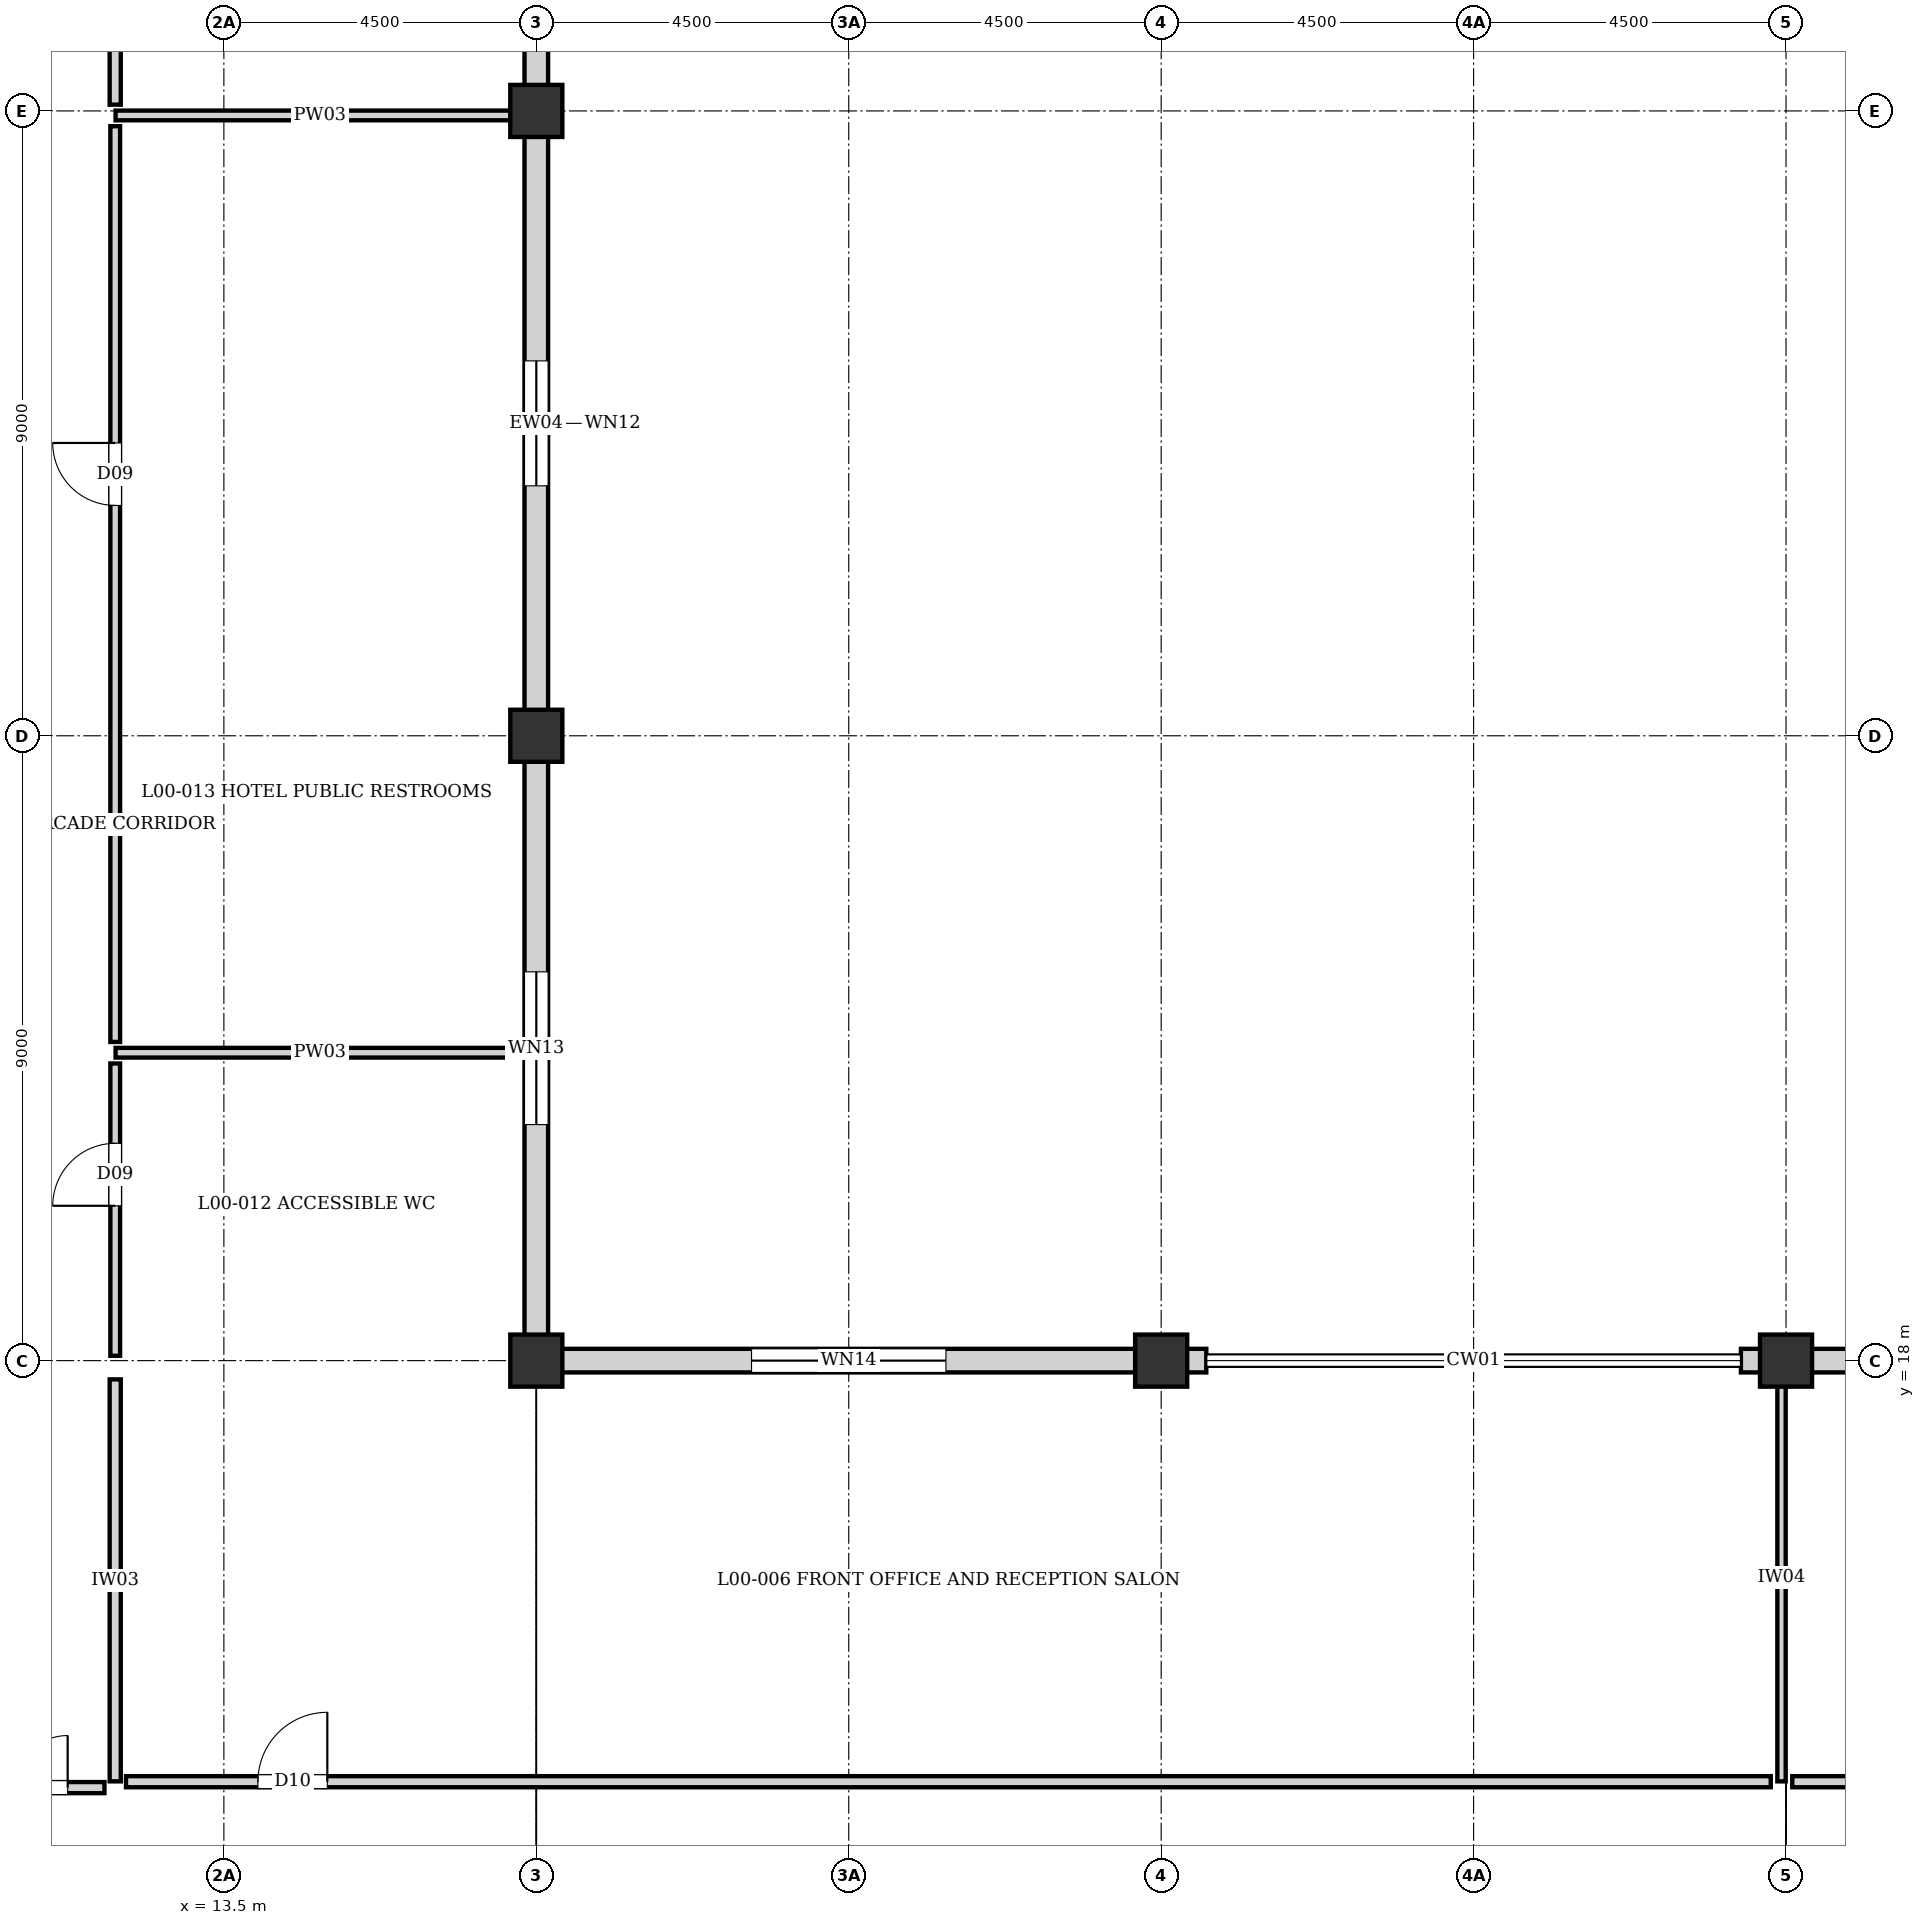
"""IFC4 building model, lengths in metres.
Left out: names, types, materials, properties, quantities, classifications, styles, units other than length and angle.
Written with IfcOpenShell. Run it as: python <this file> out.ifc"""

import sys

from ifc_helpers import new_model, si_unit, direction, frame, frame_2d, origin, origin_2d, place, context, subcontext, project, spatial, rectangle, extrude, element, fill, save


model = new_model("IFC4")
c1 = context("Model", 3, precision=1e-05, world=origin(), true_north=direction((0.0, 1.0)))
c2 = subcontext(c1, "Body", "Model", "MODEL_VIEW")
j1 = project(units=[si_unit("LENGTHUNIT", "METRE"), si_unit("PLANEANGLEUNIT", "RADIAN")], contexts=[c1])
p1 = place(None, origin())
s1 = spatial("IfcSite", under=j1, at=p1, CompositionType="ELEMENT")
p2 = place(p1, origin())
s2 = spatial("IfcBuilding", under=s1, at=p2, CompositionType="ELEMENT")
p3 = place(p2, origin())
s3 = spatial("IfcBuildingStorey", under=s2, at=p3, CompositionType="ELEMENT", Elevation=0.0)
for number, where, z_axis, x_axis in (
    (1, (18.0, 18.0, 0.0), (0.0, 0.0, 1.0), (1.0, 0.0, 0.0)),
    (2, (18.0, 27.0, 0.0), (0.0, 0.0, 1.0), (1.0, 0.0, 0.0)),
    (3, (18.0, 36.0, 0.0), (0.0, 0.0, 1.0), (1.0, 0.0, 0.0)),
    (4, (27.0, 18.0, 0.0), (0.0, 0.0, 1.0), (1.0, 0.0, 0.0)),
    (5, (36.0, 18.0, 0.0), (0.0, 0.0, 1.0), (1.0, 0.0, 0.0)),
):
    element("IfcColumn", number, at=place(p3, frame(where, z_axis=z_axis, x_axis=x_axis)), inside=s3, PredefinedType="COLUMN", context=c2, shape_type="SweptSolid", body=[
        extrude(rectangle(XDim=0.75, YDim=0.75, at=origin_2d()), origin(), (0.0, 0.0, 1.0), 4.32),
    ])
p4 = place(p3, frame((18.0, 45.0, 0.0), z_axis=(0.0, 0.0, 1.0), x_axis=(0.0, -1.0, 0.0)))
e6 = element("IfcWall", 6, at=p4, inside=s3, PredefinedType="SOLIDWALL", context=c2, shape_type="SweptSolid", body=[
    extrude(rectangle(XDim=9.0, YDim=0.34, at=frame_2d((4.5, 0.0))), origin(), (0.0, 0.0, 1.0), 3.655),
])
p5 = place(p4, frame((2.7, 0.0, 0.4)))
e7 = element("IfcOpeningElement", 7, at=p5, cuts=e6, PredefinedType="OPENING", context=c2, shape_type="SweptSolid", body=[
    extrude(rectangle(XDim=3.6, YDim=2.6, at=frame_2d((1.8, 1.3))), frame((0.0, 0.18, 0.0), z_axis=(0.0, -1.0, 0.0), x_axis=(1.0, 0.0, 0.0)), (0.0, 0.0, 1.0), 0.36),
])
p6 = place(p3, frame((18.0, 36.0, 0.0), z_axis=(0.0, 0.0, 1.0), x_axis=(0.0, -1.0, 0.0)))
e8 = element("IfcWall", 8, at=p6, inside=s3, PredefinedType="SOLIDWALL", context=c2, shape_type="SweptSolid", body=[
    extrude(rectangle(XDim=9.0, YDim=0.34, at=frame_2d((4.5, 0.0))), origin(), (0.0, 0.0, 1.0), 3.695),
])
p7 = place(p6, frame((3.6, 0.0, 0.4)))
e9 = element("IfcOpeningElement", 9, at=p7, cuts=e8, PredefinedType="OPENING", context=c2, shape_type="SweptSolid", body=[
    extrude(rectangle(XDim=1.8, YDim=2.3, at=frame_2d((0.9, 1.15))), frame((0.0, 0.18, 0.0), z_axis=(0.0, -1.0, 0.0), x_axis=(1.0, 0.0, 0.0)), (0.0, 0.0, 1.0), 0.36),
])
p8 = place(p3, frame((18.0, 27.0, 0.0), z_axis=(0.0, 0.0, 1.0), x_axis=(0.0, -1.0, 0.0)))
e10 = element("IfcWall", 10, at=p8, inside=s3, PredefinedType="SOLIDWALL", context=c2, shape_type="SweptSolid", body=[
    extrude(rectangle(XDim=8.845, YDim=0.34, at=frame_2d((4.422, 0.0))), origin(), (0.0, 0.0, 1.0), 3.755),
])
p9 = place(p8, frame((3.4, 0.0, 0.4)))
e11 = element("IfcOpeningElement", 11, at=p9, cuts=e10, PredefinedType="OPENING", context=c2, shape_type="SweptSolid", body=[
    extrude(rectangle(XDim=2.2, YDim=1.8, at=frame_2d((1.1, 0.9))), frame((0.0, 0.18, 0.0), z_axis=(0.0, -1.0, 0.0), x_axis=(1.0, 0.0, 0.0)), (0.0, 0.0, 1.0), 0.36),
])
p10 = place(p3, frame((18.0, 18.0, 0.0), z_axis=(0.0, 0.0, 1.0), x_axis=(1.0, 0.0, 0.0)))
e12 = element("IfcWall", 12, at=p10, inside=s3, PredefinedType="SOLIDWALL", context=c2, shape_type="SweptSolid", body=[
    extrude(rectangle(XDim=9.0, YDim=0.34, at=frame_2d((4.5, 0.0))), origin(), (0.0, 0.0, 1.0), 3.825),
])
p11 = place(p10, frame((3.1, 0.0, 0.4)))
e13 = element("IfcOpeningElement", 13, at=p11, cuts=e12, PredefinedType="OPENING", context=c2, shape_type="SweptSolid", body=[
    extrude(rectangle(XDim=2.8, YDim=1.7, at=frame_2d((1.4, 0.85))), frame((0.0, 0.18, 0.0), z_axis=(0.0, -1.0, 0.0), x_axis=(1.0, 0.0, 0.0)), (0.0, 0.0, 1.0), 0.36),
])
for number, where, z_axis, x_axis in (
    (14, (27.0, 18.0, 0.0), (0.0, 0.0, 1.0), (1.0, 0.0, 0.0)),
    (15, (35.35, 18.0, 0.0), (0.0, 0.0, 1.0), (1.0, 0.0, 0.0)),
):
    element("IfcWall", number, at=place(p3, frame(where, z_axis=z_axis, x_axis=x_axis)), inside=s3, PredefinedType="SOLIDWALL", context=c2, shape_type="SweptSolid", body=[
        extrude(rectangle(XDim=0.65, YDim=0.34, at=frame_2d((0.325, 0.0))), origin(), (0.0, 0.0, 1.0), 3.755),
    ])
p12 = place(p3, frame((36.0, 18.0, 0.0), z_axis=(0.0, 0.0, 1.0), x_axis=(1.0, 0.0, 0.0)))
e16 = element("IfcWall", 16, at=p12, inside=s3, PredefinedType="SOLIDWALL", context=c2, shape_type="SweptSolid", body=[
    extrude(rectangle(XDim=9.0, YDim=0.34, at=frame_2d((4.5, 0.0))), origin(), (0.0, 0.0, 1.0), 3.695),
])
p13 = place(p12, frame((3.75, 0.0, 0.4)))
e17 = element("IfcOpeningElement", 17, at=p13, cuts=e16, PredefinedType="OPENING", context=c2, shape_type="SweptSolid", body=[
    extrude(rectangle(XDim=1.5, YDim=2.5, at=frame_2d((0.75, 1.25))), frame((0.0, 0.18, 0.0), z_axis=(0.0, -1.0, 0.0), x_axis=(1.0, 0.0, 0.0)), (0.0, 0.0, 1.0), 0.36),
])
p14 = place(p3, frame((11.935, 11.94, 0.0), z_axis=(0.0, 0.0, 1.0), x_axis=(0.0, 1.0, 0.0)))
e18 = element("IfcWall", 18, at=p14, inside=s3, PredefinedType="PARTITIONING", context=c2, shape_type="SweptSolid", body=[
    extrude(rectangle(XDim=5.79, YDim=0.16, at=frame_2d((2.895, 0.0))), origin(), (0.0, 0.0, 1.0), 4.055),
])
p15 = place(p3, frame((35.935, 11.94, 0.0), z_axis=(0.0, 0.0, 1.0), x_axis=(0.0, 1.0, 0.0)))
e19 = element("IfcWall", 19, at=p15, inside=s3, PredefinedType="PARTITIONING", context=c2, shape_type="SweptSolid", body=[
    extrude(rectangle(XDim=5.885, YDim=0.12, at=frame_2d((2.942, 0.0))), origin(), (0.0, 0.0, 1.0), 3.765),
])
p16 = place(p3, frame((11.94, 22.435, 0.0), z_axis=(0.0, 0.0, 1.0), x_axis=(1.0, 0.0, 0.0)))
e20 = element("IfcWall", 20, at=p16, inside=s3, PredefinedType="PLUMBINGWALL", context=c2, shape_type="SweptSolid", body=[
    extrude(rectangle(XDim=5.885, YDim=0.14, at=frame_2d((2.942, 0.0))), origin(), (0.0, 0.0, 1.0), 4.055),
])
p17 = place(p3, frame((11.94, 35.935, 0.0), z_axis=(0.0, 0.0, 1.0), x_axis=(1.0, 0.0, 0.0)))
e21 = element("IfcWall", 21, at=p17, inside=s3, PredefinedType="PLUMBINGWALL", context=c2, shape_type="SweptSolid", body=[
    extrude(rectangle(XDim=5.885, YDim=0.14, at=frame_2d((2.942, 0.0))), origin(), (0.0, 0.0, 1.0), 3.765),
])
p18 = place(p3, frame((9.22, 11.85, 0.0), z_axis=(0.0, 0.0, 1.0), x_axis=(1.0, 0.0, 0.0)))
e22 = element("IfcWall", 22, at=p18, inside=s3, PredefinedType="PARTITIONING", context=c2, shape_type="SweptSolid", body=[
    extrude(rectangle(XDim=2.56, YDim=0.16, at=frame_2d((1.28, 0.0))), origin(), (0.0, 0.0, 1.0), 4.055),
])
p19 = place(p18, frame((0.53, 0.0, 0.0)))
e23 = element("IfcOpeningElement", 23, at=p19, cuts=e22, PredefinedType="OPENING", context=c2, shape_type="SweptSolid", body=[
    extrude(rectangle(XDim=1.5, YDim=2.1, at=frame_2d((0.75, 1.05))), frame((0.0, 0.09, 0.0), z_axis=(0.0, -1.0, 0.0), x_axis=(1.0, 0.0, 0.0)), (0.0, 0.0, 1.0), 0.18),
])
p20 = place(p3, frame((12.09, 11.935, 0.0), z_axis=(0.0, 0.0, 1.0), x_axis=(1.0, 0.0, 0.0)))
e24 = element("IfcWall", 24, at=p20, inside=s3, PredefinedType="PARTITIONING", context=c2, shape_type="SweptSolid", body=[
    extrude(rectangle(XDim=23.69, YDim=0.16, at=frame_2d((11.845, 0.0))), origin(), (0.0, 0.0, 1.0), 4.055),
])
p21 = place(p20, frame((1.9, 0.0, 0.0)))
e25 = element("IfcOpeningElement", 25, at=p21, cuts=e24, PredefinedType="OPENING", context=c2, shape_type="SweptSolid", body=[
    extrude(rectangle(XDim=1.0, YDim=2.1, at=frame_2d((0.5, 1.05))), frame((0.0, 0.09, 0.0), z_axis=(0.0, -1.0, 0.0), x_axis=(1.0, 0.0, 0.0)), (0.0, 0.0, 1.0), 0.18),
])
p22 = place(p3, frame((36.09, 11.935, 0.0), z_axis=(0.0, 0.0, 1.0), x_axis=(1.0, 0.0, 0.0)))
e26 = element("IfcWall", 26, at=p22, inside=s3, PredefinedType="PARTITIONING", context=c2, shape_type="SweptSolid", body=[
    extrude(rectangle(XDim=35.58, YDim=0.16, at=frame_2d((17.79, 0.0))), origin(), (0.0, 0.0, 1.0), 4.055),
])
p23 = place(p22, frame((13.021, 0.0, 0.0)))
e27 = element("IfcOpeningElement", 27, at=p23, cuts=e26, PredefinedType="OPENING", context=c2, shape_type="SweptSolid", body=[
    extrude(rectangle(XDim=1.0, YDim=2.1, at=frame_2d((0.5, 1.05))), frame((0.0, 0.09, 0.0), z_axis=(0.0, -1.0, 0.0), x_axis=(1.0, 0.0, 0.0)), (0.0, 0.0, 1.0), 0.18),
])
p24 = place(p3, frame((11.935, 18.07, 0.0), z_axis=(0.0, 0.0, 1.0), x_axis=(0.0, 1.0, 0.0)))
e28 = element("IfcWall", 28, at=p24, inside=s3, PredefinedType="PLUMBINGWALL", context=c2, shape_type="SweptSolid", body=[
    extrude(rectangle(XDim=4.21, YDim=0.14, at=frame_2d((2.105, 0.0))), origin(), (0.0, 0.0, 1.0), 4.055),
])
p25 = place(p24, frame((2.16, 0.0, 0.0)))
e29 = element("IfcOpeningElement", 29, at=p25, cuts=e28, PredefinedType="OPENING", context=c2, shape_type="SweptSolid", body=[
    extrude(rectangle(XDim=0.9, YDim=2.1, at=frame_2d((0.45, 1.05))), frame((0.0, 0.08, 0.0), z_axis=(0.0, -1.0, 0.0), x_axis=(1.0, 0.0, 0.0)), (0.0, 0.0, 1.0), 0.16),
])
p26 = place(p3, frame((11.935, 22.59, 0.0), z_axis=(0.0, 0.0, 1.0), x_axis=(0.0, 1.0, 0.0)))
e30 = element("IfcWall", 30, at=p26, inside=s3, PredefinedType="PLUMBINGWALL", context=c2, shape_type="SweptSolid", body=[
    extrude(rectangle(XDim=13.19, YDim=0.14, at=frame_2d((6.595, 0.0))), origin(), (0.0, 0.0, 1.0), 4.055),
])
p27 = place(p26, frame((7.728, 0.0, 0.0)))
e31 = element("IfcOpeningElement", 31, at=p27, cuts=e30, PredefinedType="OPENING", context=c2, shape_type="SweptSolid", body=[
    extrude(rectangle(XDim=0.9, YDim=2.1, at=frame_2d((0.45, 1.05))), frame((0.0, 0.08, 0.0), z_axis=(0.0, -1.0, 0.0), x_axis=(1.0, 0.0, 0.0)), (0.0, 0.0, 1.0), 0.16),
])
p28 = place(p3, frame((11.935, 36.09, 0.0), z_axis=(0.0, 0.0, 1.0), x_axis=(0.0, 1.0, 0.0)))
e32 = element("IfcWall", 32, at=p28, inside=s3, PredefinedType="PARTITIONING", context=c2, shape_type="SweptSolid", body=[
    extrude(rectangle(XDim=35.58, YDim=0.16, at=frame_2d((17.79, 0.0))), origin(), (0.0, 0.0, 1.0), 4.055),
])
p29 = place(p28, frame((13.021, 0.0, 0.0)))
e33 = element("IfcOpeningElement", 33, at=p29, cuts=e32, PredefinedType="OPENING", context=c2, shape_type="SweptSolid", body=[
    extrude(rectangle(XDim=1.0, YDim=2.1, at=frame_2d((0.5, 1.05))), frame((0.0, 0.09, 0.0), z_axis=(0.0, -1.0, 0.0), x_axis=(1.0, 0.0, 0.0)), (0.0, 0.0, 1.0), 0.18),
])
p30 = place(p7, origin())
e34 = element("IfcWindow", 34, at=p30, inside=s3, PartitioningType="SINGLE_PANEL", PredefinedType="WINDOW", context=c2, shape_type="SweptSolid", body=[
    extrude(rectangle(XDim=1.8, YDim=2.3, at=frame_2d((0.9, 1.15))), frame((0.0, 0.03, 0.0), z_axis=(0.0, -1.0, 0.0), x_axis=(1.0, 0.0, 0.0)), (0.0, 0.0, 1.0), 0.06),
])
fill(e9, e34)
p31 = place(p9, origin())
e35 = element("IfcWindow", 35, at=p31, inside=s3, PartitioningType="SINGLE_PANEL", PredefinedType="WINDOW", context=c2, shape_type="SweptSolid", body=[
    extrude(rectangle(XDim=2.2, YDim=1.8, at=frame_2d((1.1, 0.9))), frame((0.0, 0.03, 0.0), z_axis=(0.0, -1.0, 0.0), x_axis=(1.0, 0.0, 0.0)), (0.0, 0.0, 1.0), 0.06),
])
fill(e11, e35)
p32 = place(p11, origin())
e36 = element("IfcWindow", 36, at=p32, inside=s3, PartitioningType="SINGLE_PANEL", PredefinedType="WINDOW", context=c2, shape_type="SweptSolid", body=[
    extrude(rectangle(XDim=2.8, YDim=1.7, at=frame_2d((1.4, 0.85))), frame((0.0, 0.03, 0.0), z_axis=(0.0, -1.0, 0.0), x_axis=(1.0, 0.0, 0.0)), (0.0, 0.0, 1.0), 0.06),
])
fill(e13, e36)
p33 = place(p19, origin())
e37 = element("IfcDoor", 37, at=p33, inside=s3, OperationType="DOUBLE_DOOR_SINGLE_SWING", PredefinedType="DOOR", context=c2, shape_type="SweptSolid", body=[
    extrude(rectangle(XDim=1.5, YDim=2.1, at=frame_2d((0.75, 1.05))), frame((0.0, 0.025, 0.0), z_axis=(0.0, -1.0, 0.0), x_axis=(1.0, 0.0, 0.0)), (0.0, 0.0, 1.0), 0.05),
])
fill(e23, e37)
p34 = place(p21, origin())
e38 = element("IfcDoor", 38, at=p34, inside=s3, OperationType="SINGLE_SWING_RIGHT", PredefinedType="DOOR", context=c2, shape_type="SweptSolid", body=[
    extrude(rectangle(XDim=1.0, YDim=2.1, at=frame_2d((0.5, 1.05))), frame((0.0, 0.025, 0.0), z_axis=(0.0, -1.0, 0.0), x_axis=(1.0, 0.0, 0.0)), (0.0, 0.0, 1.0), 0.05),
])
fill(e25, e38)
p35 = place(p25, origin())
e39 = element("IfcDoor", 39, at=p35, inside=s3, OperationType="SINGLE_SWING_LEFT", PredefinedType="DOOR", context=c2, shape_type="SweptSolid", body=[
    extrude(rectangle(XDim=0.9, YDim=2.1, at=frame_2d((0.45, 1.05))), frame((0.0, 0.025, 0.0), z_axis=(0.0, -1.0, 0.0), x_axis=(1.0, 0.0, 0.0)), (0.0, 0.0, 1.0), 0.05),
])
fill(e29, e39)
p36 = place(p27, origin())
e40 = element("IfcDoor", 40, at=p36, inside=s3, OperationType="SINGLE_SWING_RIGHT", PredefinedType="DOOR", context=c2, shape_type="SweptSolid", body=[
    extrude(rectangle(XDim=0.9, YDim=2.1, at=frame_2d((0.45, 1.05))), frame((0.0, 0.025, 0.0), z_axis=(0.0, -1.0, 0.0), x_axis=(1.0, 0.0, 0.0)), (0.0, 0.0, 1.0), 0.05),
])
fill(e31, e40)
save(model, sys.argv[1])
